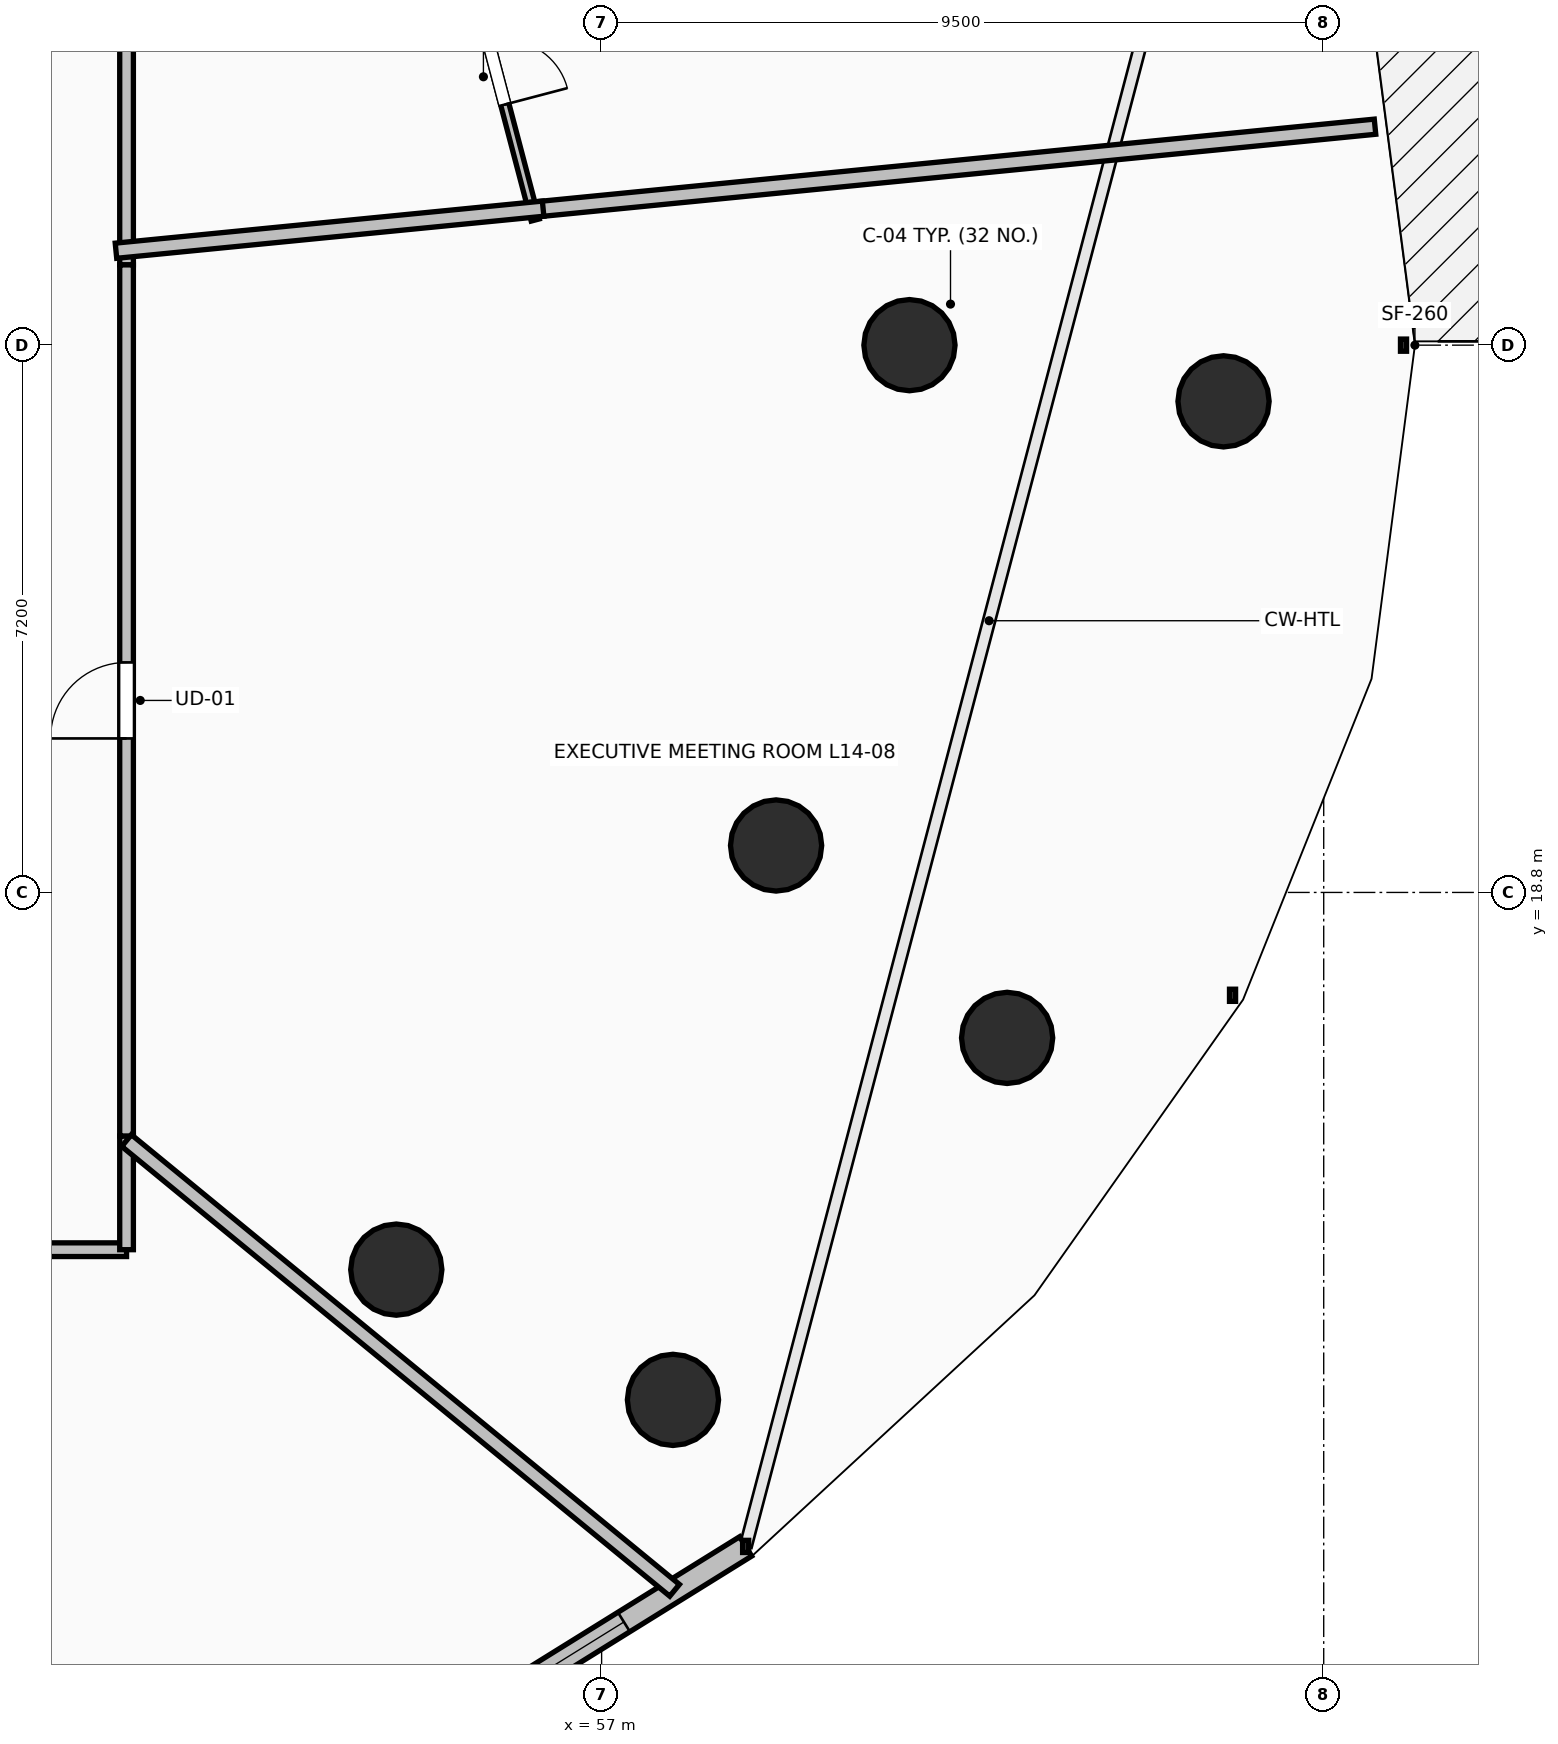
"""IFC4 building model, lengths in metres.
Left out: names, types, materials, properties, quantities, classifications, styles, units other than length and angle.
Written with IfcOpenShell. Run it as: python <this file> out.ifc"""

import sys

from ifc_helpers import new_model, si_unit, direction, frame, frame_2d, origin, origin_2d, place, context, subcontext, project, spatial, rectangle, circle, extrude, element, fill, save


model = new_model("IFC4")
c1 = context("Model", 3, precision=1e-05, world=origin(), true_north=direction((0.0, 1.0)))
c2 = subcontext(c1, "Body", "Model", "MODEL_VIEW")
j1 = project(units=[si_unit("LENGTHUNIT", "METRE"), si_unit("PLANEANGLEUNIT", "RADIAN")], contexts=[c1])
p1 = place(None, origin())
s1 = spatial("IfcSite", under=j1, at=p1, CompositionType="ELEMENT")
p2 = place(p1, origin())
s2 = spatial("IfcBuilding", under=s1, at=p2, CompositionType="ELEMENT")
p3 = place(p2, frame((0.0, 0.0, 55.5)))
s3 = spatial("IfcBuildingStorey", under=s2, at=p3, CompositionType="ELEMENT", Elevation=55.5)
for number, where, z_axis, x_axis in (
    (1, (61.05, 26.0, 0.0), (0.0, 0.0, 1.0), (1.0, 0.0, 0.0)),
    (2, (54.299, 13.838, 0.0), (0.0, 0.0, 1.0), (0.707, -0.707, 0.0)),
    (3, (59.295, 19.418, 0.0), (0.0, 0.0, 1.0), (0.924, -0.383, 0.0)),
    (4, (65.182, 25.261, 0.0), (0.0, 0.0, 1.0), (1.0, 0.0, 0.0)),
    (5, (57.939, 12.124, 0.0), (0.0, 0.0, 1.0), (0.707, -0.707, 0.0)),
    (6, (62.335, 16.886, 0.0), (0.0, 0.0, 1.0), (0.924, -0.383, 0.0)),
):
    element("IfcColumn", number, at=place(p3, frame(where, z_axis=z_axis, x_axis=x_axis)), inside=s3, PredefinedType="COLUMN", context=c2, shape_type="SweptSolid", body=[
        extrude(circle(Radius=0.6, at=origin_2d()), origin(), (0.0, 0.0, 1.0), 3.5),
    ])
p4 = place(p3, frame((54.417, 7.417, 0.0), z_axis=(0.0, 0.0, 1.0), x_axis=(0.849633724826, 0.527373239404, 0.0)))
e7 = element("IfcWall", 7, at=p4, inside=s3, PredefinedType="STANDARD", context=c2, shape_type="SweptSolid", body=[
    extrude(rectangle(XDim=5.271, YDim=0.3, at=frame_2d((2.635, 0.0))), origin(), (0.0, 0.0, 1.0), 3.24),
])
p5 = place(p4, frame((1.885, 0.0, 0.85)))
e8 = element("IfcOpeningElement", 8, at=p5, cuts=e7, PredefinedType="OPENING", context=c2, shape_type="SweptSolid", body=[
    extrude(rectangle(XDim=1.5, YDim=2.19, at=frame_2d((0.75, 1.095))), frame((0.0, 0.165, 0.0), z_axis=(0.0, -1.0, 0.0), x_axis=(1.0, 0.0, 0.0)), (0.0, 0.0, 1.0), 0.33),
])
p6 = place(p3, frame((50.75, 27.056, 0.0), z_axis=(0.0, 0.0, 1.0), x_axis=(0.0, 1.0, 0.0)))
e9 = element("IfcWall", 9, at=p6, inside=s3, PredefinedType="PARTITIONING", context=c2, shape_type="SweptSolid", body=[
    extrude(rectangle(XDim=5.085, YDim=0.18, at=frame_2d((2.542, 0.0))), origin(), (0.0, 0.0, 1.0), 2.432),
])
p7 = place(p3, frame((42.34, 14.1, 0.0), z_axis=(0.0, 0.0, 1.0), x_axis=(1.0, 0.0, 0.0)))
e10 = element("IfcWall", 10, at=p7, inside=s3, PredefinedType="PARTITIONING", context=c2, shape_type="SweptSolid", body=[
    extrude(rectangle(XDim=8.41, YDim=0.18, at=frame_2d((4.205, 0.0))), origin(), (0.0, 0.0, 1.0), 2.432),
])
p8 = place(p7, frame((3.705, 0.0, 0.0)))
e11 = element("IfcOpeningElement", 11, at=p8, cuts=e10, PredefinedType="OPENING", context=c2, shape_type="SweptSolid", body=[
    extrude(rectangle(XDim=1.0, YDim=2.15, at=frame_2d((0.5, 1.075))), frame((0.0, 0.105, 0.0), z_axis=(0.0, -1.0, 0.0), x_axis=(1.0, 0.0, 0.0)), (0.0, 0.0, 1.0), 0.21),
])
p9 = place(p3, frame((50.75, 14.1, 0.0), z_axis=(0.0, 0.0, 1.0), x_axis=(0.0, 1.0, 0.0)))
e12 = element("IfcWall", 12, at=p9, inside=s3, PredefinedType="PARTITIONING", context=c2, shape_type="SweptSolid", body=[
    extrude(rectangle(XDim=1.496, YDim=0.18, at=frame_2d((0.748, 0.0))), origin(), (0.0, 0.0, 1.0), 2.432),
])
p10 = place(p3, frame((50.75, 15.596, 0.0), z_axis=(0.0, 0.0, 1.0), x_axis=(0.0, 1.0, 0.0)))
e13 = element("IfcWall", 13, at=p10, inside=s3, PredefinedType="PARTITIONING", context=c2, shape_type="SweptSolid", body=[
    extrude(rectangle(XDim=11.46, YDim=0.18, at=frame_2d((5.73, 0.0))), origin(), (0.0, 0.0, 1.0), 2.432),
])
p11 = place(p10, frame((5.23, 0.0, 0.0)))
e14 = element("IfcOpeningElement", 14, at=p11, cuts=e13, PredefinedType="OPENING", context=c2, shape_type="SweptSolid", body=[
    extrude(rectangle(XDim=1.0, YDim=2.15, at=frame_2d((0.5, 1.075))), frame((0.0, 0.105, 0.0), z_axis=(0.0, -1.0, 0.0), x_axis=(1.0, 0.0, 0.0)), (0.0, 0.0, 1.0), 0.21),
])
p12 = place(p3, frame((55.111, 31.506, 0.0), z_axis=(0.0, 0.0, 1.0), x_axis=(0.254405980461, -0.967097511684, 0.0)))
e15 = element("IfcWall", 15, at=p12, inside=s3, PredefinedType="PARTITIONING", context=c2, shape_type="SweptSolid", body=[
    extrude(rectangle(XDim=3.991, YDim=0.11, at=frame_2d((1.996, 0.0))), origin(), (0.0, 0.0, 1.0), 3.24),
])
p13 = place(p12, frame((1.571, 0.0, 0.0)))
e16 = element("IfcOpeningElement", 16, at=p13, cuts=e15, PredefinedType="OPENING", context=c2, shape_type="SweptSolid", body=[
    extrude(rectangle(XDim=0.85, YDim=2.1, at=frame_2d((0.425, 1.05))), frame((0.0, 0.07, 0.0), z_axis=(0.0, -1.0, 0.0), x_axis=(1.0, 0.0, 0.0)), (0.0, 0.0, 1.0), 0.14),
])
p14 = place(p3, frame((56.091, 27.782, 0.0), z_axis=(0.0, 0.0, 1.0), x_axis=(0.995181539585, 0.098049493977, 0.0)))
e17 = element("IfcWall", 17, at=p14, inside=s3, PredefinedType="PARTITIONING", context=c2, shape_type="SweptSolid", body=[
    extrude(rectangle(XDim=11.138, YDim=0.2, at=frame_2d((5.569, 0.0))), origin(), (0.0, 0.0, 1.0), 2.624),
])
p15 = place(p3, frame((50.611, 27.242, 0.0), z_axis=(0.0, 0.0, 1.0), x_axis=(0.995185043486, 0.098013923607, 0.0)))
e18 = element("IfcWall", 18, at=p15, inside=s3, PredefinedType="PARTITIONING", context=c2, shape_type="SweptSolid", body=[
    extrude(rectangle(XDim=5.647, YDim=0.2, at=frame_2d((2.823, 0.0))), origin(), (0.0, 0.0, 1.0), 2.432),
])
p16 = place(p3, frame((57.96, 9.619, 0.0), z_axis=(0.0, 0.0, 1.0), x_axis=(-0.773014125172, 0.634388810025, 0.0)))
e19 = element("IfcWall", 19, at=p16, inside=s3, PredefinedType="PARTITIONING", context=c2, shape_type="SweptSolid", body=[
    extrude(rectangle(XDim=9.327, YDim=0.2, at=frame_2d((4.664, 0.0))), origin(), (0.0, 0.0, 1.0), 2.432),
])
p17 = place(p5, origin())
e20 = element("IfcWindow", 20, at=p17, inside=s3, PartitioningType="SINGLE_PANEL", PredefinedType="WINDOW", context=c2, shape_type="SweptSolid", body=[
    extrude(rectangle(XDim=1.5, YDim=2.19, at=frame_2d((0.75, 1.095))), frame((0.0, 0.03, 0.0), z_axis=(0.0, -1.0, 0.0), x_axis=(1.0, 0.0, 0.0)), (0.0, 0.0, 1.0), 0.06),
])
fill(e8, e20)
p18 = place(p11, origin())
e21 = element("IfcDoor", 21, at=p18, inside=s3, OperationType="SINGLE_SWING_LEFT", PredefinedType="DOOR", context=c2, shape_type="SweptSolid", body=[
    extrude(rectangle(XDim=1.0, YDim=2.15, at=frame_2d((0.5, 1.075))), frame((0.0, 0.025, 0.0), z_axis=(0.0, -1.0, 0.0), x_axis=(1.0, 0.0, 0.0)), (0.0, 0.0, 1.0), 0.05),
])
fill(e14, e21)
p19 = place(p13, origin())
e22 = element("IfcDoor", 22, at=p19, inside=s3, OperationType="SINGLE_SWING_RIGHT", PredefinedType="DOOR", context=c2, shape_type="SweptSolid", body=[
    extrude(rectangle(XDim=0.85, YDim=2.1, at=frame_2d((0.425, 1.05))), frame((0.0, 0.025, 0.0), z_axis=(0.0, -1.0, 0.0), x_axis=(1.0, 0.0, 0.0)), (0.0, 0.0, 1.0), 0.05),
])
fill(e16, e22)
save(model, sys.argv[1])
